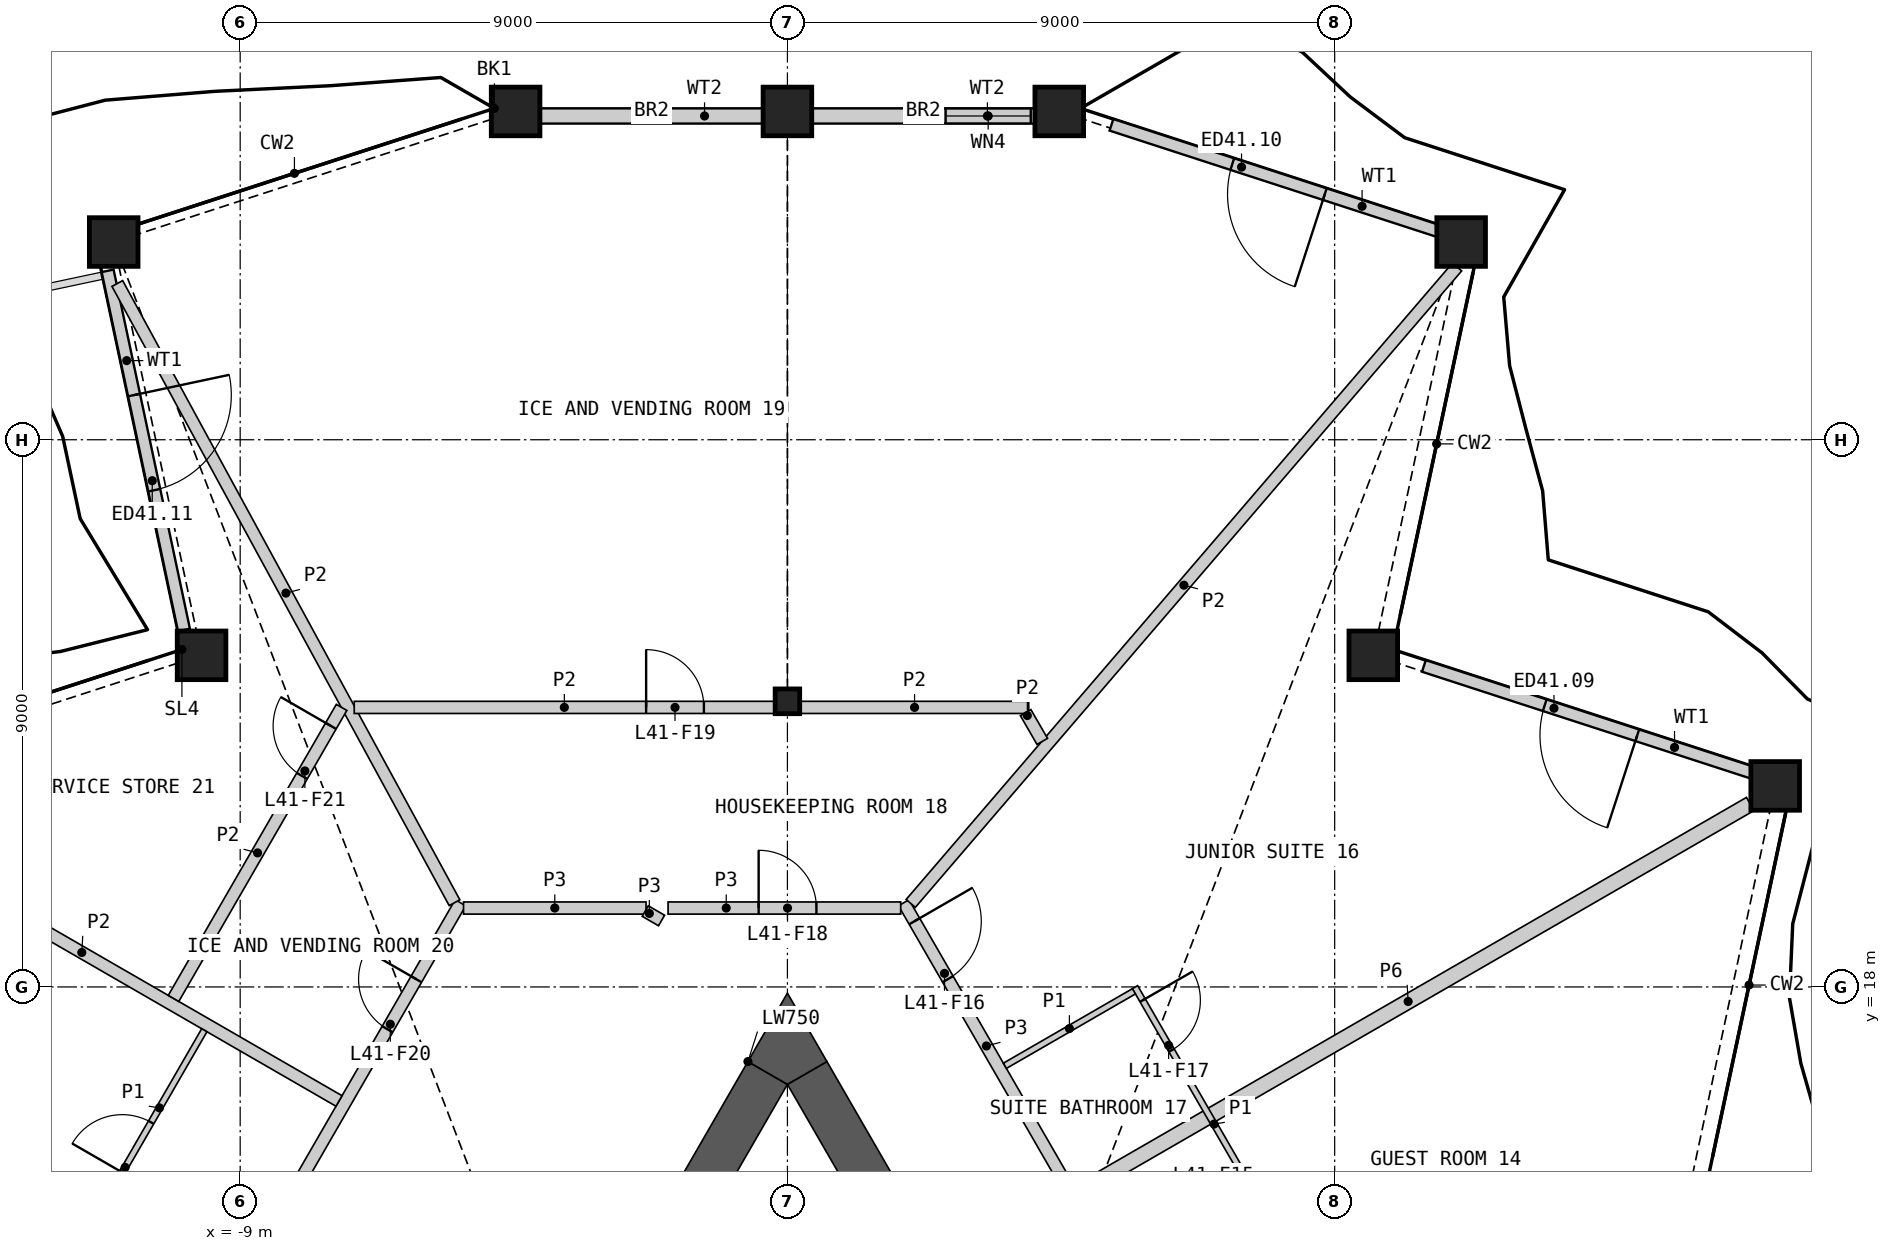
"""IFC4 building model, lengths in metres.
Left out: names, types, materials, properties, quantities, classifications, styles, units other than length and angle.
Written with IfcOpenShell. Run it as: python <this file> out.ifc"""

import sys

from ifc_helpers import new_model, si_unit, direction, frame, frame_2d, origin, origin_2d, place, context, subcontext, project, spatial, polyline, rectangle, hollow_rectangle, i_section, outline, extrude, element, fill, save


model = new_model("IFC4")
c1 = context("Model", 3, precision=1e-05, world=origin(), true_north=direction((0.0, 1.0)))
c2 = subcontext(c1, "Body", "Model", "MODEL_VIEW")
j1 = project(units=[si_unit("LENGTHUNIT", "METRE"), si_unit("PLANEANGLEUNIT", "RADIAN")], contexts=[c1])
p1 = place(None, origin())
s1 = spatial("IfcSite", under=j1, at=p1, CompositionType="ELEMENT")
p2 = place(p1, origin())
s2 = spatial("IfcBuilding", under=s1, at=p2, CompositionType="ELEMENT")
p3 = place(p2, frame((0.0, 0.0, 190.8)))
s3 = spatial("IfcBuildingStorey", under=s2, at=p3, CompositionType="ELEMENT", Elevation=190.8)
for number, where, z_axis, x_axis in (
    (1, (16.245, 21.306, 0.0), (0.0, 0.0, 1.0), (1.0, 0.0, 0.0)),
    (2, (9.635, 23.454, 0.0), (0.0, 0.0, 1.0), (1.0, 0.0, 0.0)),
    (3, (11.08, 30.252, 0.0), (0.0, 0.0, 1.0), (1.0, 0.0, 0.0)),
    (4, (4.47, 32.399, 0.0), (0.0, 0.0, 1.0), (1.0, 0.0, 0.0)),
    (5, (0.0, 32.399, 0.0), (0.0, 0.0, 1.0), (1.0, 0.0, 0.0)),
    (6, (-4.47, 32.399, 0.0), (0.0, 0.0, 1.0), (1.0, 0.0, 0.0)),
    (7, (-11.08, 30.252, 0.0), (0.0, 0.0, 1.0), (1.0, 0.0, 0.0)),
    (8, (-9.635, 23.454, 0.0), (0.0, 0.0, 1.0), (1.0, 0.0, 0.0)),
):
    element("IfcColumn", number, at=place(p3, frame(where, z_axis=z_axis, x_axis=x_axis)), inside=s3, PredefinedType="COLUMN", context=c2, shape_type="SweptSolid", body=[
        extrude(hollow_rectangle(XDim=0.8, YDim=0.8, WallThickness=0.05, at=origin_2d()), origin(), (0.0, 0.0, 1.0), 3.6),
    ])
p4 = place(p3, frame((0.0, 22.698, 0.0), z_axis=(0.0, 0.0, 1.0), x_axis=(1.0, 0.0, 0.0)))
e9 = element("IfcColumn", 9, at=p4, inside=s3, PredefinedType="COLUMN", context=c2, shape_type="SweptSolid", body=[
    extrude(i_section(OverallWidth=0.404, OverallDepth=0.407, WebThickness=0.027, FlangeThickness=0.044, at=origin_2d()), origin(), (0.0, 0.0, 1.0), 3.6),
])
p5 = place(p3, frame((15.963, 21.493, 0.0), z_axis=(0.0, 0.0, 1.0), x_axis=(-0.951059834965, 0.309006780371, 0.0)))
e10 = element("IfcWall", 10, at=p5, inside=s3, PredefinedType="SOLIDWALL", context=c2, shape_type="SweptSolid", body=[
    extrude(rectangle(XDim=5.779, YDim=0.2, at=frame_2d((2.889, 0.0))), origin(), (0.0, 0.0, 1.0), 2.701),
])
p6 = place(p5, frame((2.089, 0.0, 0.0)))
e11 = element("IfcOpeningElement", 11, at=p6, cuts=e10, PredefinedType="OPENING", context=c2, shape_type="SweptSolid", body=[
    extrude(rectangle(XDim=1.6, YDim=2.4, at=frame_2d((0.8, 1.2))), frame((0.0, 0.11, 0.0), z_axis=(0.0, -1.0, 0.0), x_axis=(1.0, 0.0, 0.0)), (0.0, 0.0, 1.0), 0.22),
])
p7 = place(p3, frame((10.825, 30.394, 0.0), z_axis=(0.0, 0.0, 1.0), x_axis=(-0.9510558006, 0.30901919705, 0.0)))
e12 = element("IfcWall", 12, at=p7, inside=s3, PredefinedType="SOLIDWALL", context=c2, shape_type="SweptSolid", body=[
    extrude(rectangle(XDim=5.778, YDim=0.2, at=frame_2d((2.889, 0.0))), origin(), (0.0, 0.0, 1.0), 2.701),
])
p8 = place(p7, frame((2.089, 0.0, 0.0)))
e13 = element("IfcOpeningElement", 13, at=p8, cuts=e12, PredefinedType="OPENING", context=c2, shape_type="SweptSolid", body=[
    extrude(rectangle(XDim=1.6, YDim=2.4, at=frame_2d((0.8, 1.2))), frame((0.0, 0.11, 0.0), z_axis=(0.0, -1.0, 0.0), x_axis=(1.0, 0.0, 0.0)), (0.0, 0.0, 1.0), 0.22),
])
p9 = place(p3, frame((4.252, 32.325, 0.0), z_axis=(0.0, 0.0, 1.0), x_axis=(-1.0, 0.0, 0.0)))
e14 = element("IfcWall", 14, at=p9, inside=s3, PredefinedType="SOLIDWALL", context=c2, shape_type="SweptSolid", body=[
    extrude(rectangle(XDim=3.852, YDim=0.25, at=frame_2d((1.926, 0.0))), origin(), (0.0, 0.0, 1.0), 2.701),
])
p10 = place(p9, frame((0.25, 0.0, 0.4)))
e15 = element("IfcOpeningElement", 15, at=p10, cuts=e14, PredefinedType="OPENING", context=c2, shape_type="SweptSolid", body=[
    extrude(rectangle(XDim=1.4, YDim=0.7, at=frame_2d((0.7, 0.35))), frame((0.0, 0.135, 0.0), z_axis=(0.0, -1.0, 0.0), x_axis=(1.0, 0.0, 0.0)), (0.0, 0.0, 1.0), 0.27),
])
p11 = place(p3, frame((-0.4, 32.325, 0.0), z_axis=(0.0, 0.0, 1.0), x_axis=(-1.0, 0.0, 0.0)))
e16 = element("IfcWall", 16, at=p11, inside=s3, PredefinedType="SOLIDWALL", context=c2, shape_type="SweptSolid", body=[
    extrude(rectangle(XDim=3.852, YDim=0.25, at=frame_2d((1.926, 0.0))), origin(), (0.0, 0.0, 1.0), 2.701),
])
p12 = place(p3, frame((-11.18, 29.778, 0.0), z_axis=(0.0, 0.0, 1.0), x_axis=(0.207894531291, -0.978151247946, 0.0)))
e17 = element("IfcWall", 17, at=p12, inside=s3, PredefinedType="SOLIDWALL", context=c2, shape_type="SweptSolid", body=[
    extrude(rectangle(XDim=6.04, YDim=0.2, at=frame_2d((3.02, 0.0))), origin(), (0.0, 0.0, 1.0), 2.701),
])
p13 = place(p12, frame((2.089, 0.0, 0.0)))
e18 = element("IfcOpeningElement", 18, at=p13, cuts=e17, PredefinedType="OPENING", context=c2, shape_type="SweptSolid", body=[
    extrude(rectangle(XDim=1.6, YDim=2.4, at=frame_2d((0.8, 1.2))), frame((0.0, 0.11, 0.0), z_axis=(0.0, -1.0, 0.0), x_axis=(1.0, 0.0, 0.0)), (0.0, 0.0, 1.0), 0.22),
])
p14 = place(p3, frame((6.875, 5.24, 0.0), z_axis=(0.0, 0.0, 1.0), x_axis=(-0.499997217876, 0.866027010039, 0.0)))
e19 = element("IfcWall", 19, at=p14, inside=s3, PredefinedType="SHEAR", context=c2, shape_type="SweptSolid", body=[
    extrude(rectangle(XDim=13.101, YDim=0.75, at=frame_2d((6.551, 0.0))), origin(), (0.0, 0.0, 1.0), 3.25),
])
p15 = place(p3, frame((-0.325, 16.585, 0.0), z_axis=(0.0, 0.0, 1.0), x_axis=(-0.500012199891, -0.86601836006, 0.0)))
e20 = element("IfcWall", 20, at=p15, inside=s3, PredefinedType="SHEAR", context=c2, shape_type="SweptSolid", body=[
    extrude(rectangle(XDim=7.051, YDim=0.75, at=frame_2d((3.525, 0.0))), origin(), (0.0, 0.0, 1.0), 3.25),
])
p16 = place(p3, origin())
e21 = element("IfcWall", 21, at=p16, inside=s3, PredefinedType="SHEAR", context=c2, shape_type="SweptSolid", body=[
    extrude(outline(polyline([(-0.649, 16.773), (0.0, 17.898), (0.649, 16.773), (0.0, 16.398), (-0.649, 16.773)])), origin(), (0.0, 0.0, 1.0), 3.25),
])
p17 = place(p3, frame((-19.476, -5.035, 0.0), z_axis=(0.0, 0.0, 1.0), x_axis=(0.500000757641, 0.86602496636, 0.0)))
e22 = element("IfcWall", 22, at=p17, inside=s3, PredefinedType="PARTITIONING", context=c2, shape_type="SweptSolid", body=[
    extrude(rectangle(XDim=28.198, YDim=0.2, at=frame_2d((14.099, 0.0))), origin(), (0.0, 0.0, 1.0), 3.25),
])
p18 = place(p17, frame((25.796, 0.0, 0.0)))
e23 = element("IfcOpeningElement", 23, at=p18, cuts=e22, PredefinedType="OPENING", context=c2, shape_type="SweptSolid", body=[
    extrude(rectangle(XDim=0.95, YDim=2.1, at=frame_2d((0.475, 1.05))), frame((0.0, 0.11, 0.0), z_axis=(0.0, -1.0, 0.0), x_axis=(1.0, 0.0, 0.0)), (0.0, 0.0, 1.0), 0.22),
])
p19 = place(p17, frame((14.603, 0.0, 0.0)))
e24 = element("IfcOpeningElement", 24, at=p19, cuts=e22, PredefinedType="OPENING", context=c2, shape_type="SweptSolid", body=[
    extrude(rectangle(XDim=1.1, YDim=2.1, at=frame_2d((0.55, 1.05))), frame((0.0, 0.11, 0.0), z_axis=(0.0, -1.0, 0.0), x_axis=(1.0, 0.0, 0.0)), (0.0, 0.0, 1.0), 0.22),
])
p20 = place(p17, frame((11.993, 0.0, 0.0)))
e25 = element("IfcOpeningElement", 25, at=p20, cuts=e22, PredefinedType="OPENING", context=c2, shape_type="SweptSolid", body=[
    extrude(rectangle(XDim=1.1, YDim=2.1, at=frame_2d((0.55, 1.05))), frame((0.0, 0.11, 0.0), z_axis=(0.0, -1.0, 0.0), x_axis=(1.0, 0.0, 0.0)), (0.0, 0.0, 1.0), 0.22),
])
p21 = place(p17, frame((1.452, 0.0, 0.0)))
e26 = element("IfcOpeningElement", 26, at=p21, cuts=e22, PredefinedType="OPENING", context=c2, shape_type="SweptSolid", body=[
    extrude(rectangle(XDim=0.95, YDim=2.1, at=frame_2d((0.475, 1.05))), frame((0.0, 0.11, 0.0), z_axis=(0.0, -1.0, 0.0), x_axis=(1.0, 0.0, 0.0)), (0.0, 0.0, 1.0), 0.22),
])
p22 = place(p3, frame((4.582, 14.512, 0.0), z_axis=(0.0, 0.0, 1.0), x_axis=(0.866027263711, 0.4999967785, 0.0)))
e27 = element("IfcWall", 27, at=p22, inside=s3, PredefinedType="PARTITIONING", context=c2, shape_type="SweptSolid", body=[
    extrude(rectangle(XDim=12.994, YDim=0.25, at=frame_2d((6.497, 0.0))), origin(), (0.0, 0.0, 1.0), 2.404),
])
p23 = place(p3, frame((1.913, 19.385, 0.0), z_axis=(0.0, 0.0, 1.0), x_axis=(0.499972435384, -0.866041317638, 0.0)))
e28 = element("IfcWall", 28, at=p23, inside=s3, PredefinedType="PARTITIONING", context=c2, shape_type="SweptSolid", body=[
    extrude(rectangle(XDim=5.439, YDim=0.2, at=frame_2d((2.719, 0.0))), origin(), (0.0, 0.0, 1.0), 3.25),
])
p24 = place(p23, frame((0.351, 0.0, 0.0)))
e29 = element("IfcOpeningElement", 29, at=p24, cuts=e28, PredefinedType="OPENING", context=c2, shape_type="SweptSolid", body=[
    extrude(rectangle(XDim=1.1, YDim=2.1, at=frame_2d((0.55, 1.05))), frame((0.0, 0.11, 0.0), z_axis=(0.0, -1.0, 0.0), x_axis=(1.0, 0.0, 0.0)), (0.0, 0.0, 1.0), 0.22),
])
p25 = place(p3, frame((-1.963, 19.298, 0.0), z_axis=(0.0, 0.0, 1.0), x_axis=(1.0, 0.0, 0.0)))
e30 = element("IfcWall", 30, at=p25, inside=s3, PredefinedType="PARTITIONING", context=c2, shape_type="SweptSolid", body=[
    extrude(rectangle(XDim=3.826, YDim=0.2, at=frame_2d((1.913, 0.0))), origin(), (0.0, 0.0, 1.0), 3.25),
])
p26 = place(p25, frame((1.49, 0.0, 0.0)))
e31 = element("IfcOpeningElement", 31, at=p26, cuts=e30, PredefinedType="OPENING", context=c2, shape_type="SweptSolid", body=[
    extrude(rectangle(XDim=0.95, YDim=2.1, at=frame_2d((0.475, 1.05))), frame((0.0, 0.11, 0.0), z_axis=(0.0, -1.0, 0.0), x_axis=(1.0, 0.0, 0.0)), (0.0, 0.0, 1.0), 0.22),
])
p27 = place(p3, frame((-5.327, 19.298, 0.0), z_axis=(0.0, 0.0, 1.0), x_axis=(1.0, 0.0, 0.0)))
e32 = element("IfcWall", 32, at=p27, inside=s3, PredefinedType="PARTITIONING", context=c2, shape_type="SweptSolid", body=[
    extrude(rectangle(XDim=3.002, YDim=0.2, at=frame_2d((1.501, 0.0))), origin(), (0.0, 0.0, 1.0), 3.25),
])
p28 = place(p3, frame((-2.338, 19.248, 0.0), z_axis=(0.0, 0.0, 1.0), x_axis=(0.866395311824, -0.499358752451, 0.0)))
e33 = element("IfcWall", 33, at=p28, inside=s3, PredefinedType="PARTITIONING", context=c2, shape_type="SweptSolid", body=[
    extrude(rectangle(XDim=0.31, YDim=0.2, at=frame_2d((0.155, 0.0))), origin(), (0.0, 0.0, 1.0), 3.25),
])
p29 = place(p3, frame((2.028, 19.374, 0.0), z_axis=(0.0, 0.0, 1.0), x_axis=(0.651304244859, 0.758816697647, 0.0)))
e34 = element("IfcWall", 34, at=p29, inside=s3, PredefinedType="PARTITIONING", context=c2, shape_type="SweptSolid", body=[
    extrude(rectangle(XDim=13.795, YDim=0.2, at=frame_2d((6.897, 0.0))), origin(), (0.0, 0.0, 1.0), 2.404),
])
p30 = place(p3, frame((-11.021, 29.57, 0.0), z_axis=(0.0, 0.0, 1.0), x_axis=(0.478233946204, -0.878232482147, 0.0)))
e35 = element("IfcWall", 35, at=p30, inside=s3, PredefinedType="PARTITIONING", context=c2, shape_type="SweptSolid", body=[
    extrude(rectangle(XDim=11.596, YDim=0.2, at=frame_2d((5.798, 0.0))), origin(), (0.0, 0.0, 1.0), 2.404),
])
p31 = place(p3, frame((-15.835, 21.009, 0.0), z_axis=(0.0, 0.0, 1.0), x_axis=(0.866024525919, -0.500001520505, 0.0)))
e36 = element("IfcWall", 36, at=p31, inside=s3, PredefinedType="PARTITIONING", context=c2, shape_type="SweptSolid", body=[
    extrude(rectangle(XDim=9.769, YDim=0.2, at=frame_2d((4.885, 0.0))), origin(), (0.0, 0.0, 1.0), 2.404),
])
p32 = place(p3, frame((-7.124, 22.598, 0.0), z_axis=(0.0, 0.0, 1.0), x_axis=(1.0, 0.0, 0.0)))
e37 = element("IfcWall", 37, at=p32, inside=s3, PredefinedType="PARTITIONING", context=c2, shape_type="SweptSolid", body=[
    extrude(rectangle(XDim=6.911, YDim=0.2, at=frame_2d((3.455, 0.0))), origin(), (0.0, 0.0, 1.0), 2.404),
])
p33 = place(p32, frame((4.801, 0.0, 0.0)))
e38 = element("IfcOpeningElement", 38, at=p33, cuts=e37, PredefinedType="OPENING", context=c2, shape_type="SweptSolid", body=[
    extrude(rectangle(XDim=0.95, YDim=2.1, at=frame_2d((0.475, 1.05))), frame((0.0, 0.11, 0.0), z_axis=(0.0, -1.0, 0.0), x_axis=(1.0, 0.0, 0.0)), (0.0, 0.0, 1.0), 0.22),
])
p34 = place(p3, frame((-10.096, 17.811, 0.0), z_axis=(0.0, 0.0, 1.0), x_axis=(0.500015590807, 0.866016402241, 0.0)))
e39 = element("IfcWall", 39, at=p34, inside=s3, PredefinedType="PARTITIONING", context=c2, shape_type="SweptSolid", body=[
    extrude(rectangle(XDim=5.527, YDim=0.2, at=frame_2d((2.764, 0.0))), origin(), (0.0, 0.0, 1.0), 2.404),
])
p35 = place(p34, frame((4.225, 0.0, 0.0)))
e40 = element("IfcOpeningElement", 40, at=p35, cuts=e39, PredefinedType="OPENING", context=c2, shape_type="SweptSolid", body=[
    extrude(rectangle(XDim=0.95, YDim=2.1, at=frame_2d((0.475, 1.05))), frame((0.0, 0.11, 0.0), z_axis=(0.0, -1.0, 0.0), x_axis=(1.0, 0.0, 0.0)), (0.0, 0.0, 1.0), 0.22),
])
p36 = place(p3, frame((0.214, 22.598, 0.0), z_axis=(0.0, 0.0, 1.0), x_axis=(1.0, 0.0, 0.0)))
e41 = element("IfcWall", 41, at=p36, inside=s3, PredefinedType="PARTITIONING", context=c2, shape_type="SweptSolid", body=[
    extrude(rectangle(XDim=3.755, YDim=0.2, at=frame_2d((1.877, 0.0))), origin(), (0.0, 0.0, 1.0), 2.404),
])
p37 = place(p3, frame((3.918, 22.511, 0.0), z_axis=(0.0, 0.0, 1.0), x_axis=(0.500083826171, -0.865977001312, 0.0)))
e42 = element("IfcWall", 42, at=p37, inside=s3, PredefinedType="PARTITIONING", context=c2, shape_type="SweptSolid", body=[
    extrude(rectangle(XDim=0.546, YDim=0.2, at=frame_2d((0.273, 0.0))), origin(), (0.0, 0.0, 1.0), 2.404),
])
p38 = place(p3, frame((5.717, 17.996, 0.0), z_axis=(0.0, 0.0, 1.0), x_axis=(0.500027264788, -0.866009661879, 0.0)))
e43 = element("IfcWall", 43, at=p38, inside=s3, PredefinedType="PARTITIONING", context=c2, shape_type="SweptSolid", body=[
    extrude(rectangle(XDim=5.2, YDim=0.1, at=frame_2d((2.6, 0.0))), origin(), (0.0, 0.0, 1.0), 2.404),
])
p39 = place(p38, frame((4.0, 0.0, 0.0)))
e44 = element("IfcOpeningElement", 44, at=p39, cuts=e43, PredefinedType="OPENING", context=c2, shape_type="SweptSolid", body=[
    extrude(rectangle(XDim=0.95, YDim=2.1, at=frame_2d((0.475, 1.05))), frame((0.0, 0.06, 0.0), z_axis=(0.0, -1.0, 0.0), x_axis=(1.0, 0.0, 0.0)), (0.0, 0.0, 1.0), 0.12),
])
p40 = place(p38, frame((0.25, 0.0, 0.0)))
e45 = element("IfcOpeningElement", 45, at=p40, cuts=e43, PredefinedType="OPENING", context=c2, shape_type="SweptSolid", body=[
    extrude(rectangle(XDim=0.95, YDim=2.1, at=frame_2d((0.475, 1.05))), frame((0.0, 0.06, 0.0), z_axis=(0.0, -1.0, 0.0), x_axis=(1.0, 0.0, 0.0)), (0.0, 0.0, 1.0), 0.12),
])
p41 = place(p3, frame((-11.065, 14.733, 0.0), z_axis=(0.0, 0.0, 1.0), x_axis=(0.500037662692, 0.866003658127, 0.0)))
e46 = element("IfcWall", 46, at=p41, inside=s3, PredefinedType="PARTITIONING", context=c2, shape_type="SweptSolid", body=[
    extrude(rectangle(XDim=2.95, YDim=0.1, at=frame_2d((1.475, 0.0))), origin(), (0.0, 0.0, 1.0), 2.404),
])
p42 = place(p41, frame((0.25, 0.0, 0.0)))
e47 = element("IfcOpeningElement", 47, at=p42, cuts=e46, PredefinedType="OPENING", context=c2, shape_type="SweptSolid", body=[
    extrude(rectangle(XDim=0.95, YDim=2.1, at=frame_2d((0.475, 1.05))), frame((0.0, 0.06, 0.0), z_axis=(0.0, -1.0, 0.0), x_axis=(1.0, 0.0, 0.0)), (0.0, 0.0, 1.0), 0.12),
])
p43 = place(p3, frame((3.576, 16.703, 0.0), z_axis=(0.0, 0.0, 1.0), x_axis=(0.866057815567, 0.499943856944, 0.0)))
e48 = element("IfcWall", 48, at=p43, inside=s3, PredefinedType="PARTITIONING", context=c2, shape_type="SweptSolid", body=[
    extrude(rectangle(XDim=2.45, YDim=0.1, at=frame_2d((1.225, 0.0))), origin(), (0.0, 0.0, 1.0), 2.404),
])
p44 = place(p6, origin())
e49 = element("IfcDoor", 49, at=p44, inside=s3, OperationType="DOUBLE_DOOR_SINGLE_SWING", PredefinedType="DOOR", context=c2, shape_type="SweptSolid", body=[
    extrude(rectangle(XDim=1.6, YDim=2.4, at=frame_2d((0.8, 1.2))), frame((0.0, 0.025, 0.0), z_axis=(0.0, -1.0, 0.0), x_axis=(1.0, 0.0, 0.0)), (0.0, 0.0, 1.0), 0.05),
])
fill(e11, e49)
p45 = place(p8, origin())
e50 = element("IfcDoor", 50, at=p45, inside=s3, OperationType="DOUBLE_DOOR_SINGLE_SWING", PredefinedType="DOOR", context=c2, shape_type="SweptSolid", body=[
    extrude(rectangle(XDim=1.6, YDim=2.4, at=frame_2d((0.8, 1.2))), frame((0.0, 0.025, 0.0), z_axis=(0.0, -1.0, 0.0), x_axis=(1.0, 0.0, 0.0)), (0.0, 0.0, 1.0), 0.05),
])
fill(e13, e50)
p46 = place(p10, origin())
e51 = element("IfcWindow", 51, at=p46, inside=s3, PartitioningType="SINGLE_PANEL", PredefinedType="WINDOW", context=c2, shape_type="SweptSolid", body=[
    extrude(rectangle(XDim=1.4, YDim=0.7, at=frame_2d((0.7, 0.35))), frame((0.0, 0.03, 0.0), z_axis=(0.0, -1.0, 0.0), x_axis=(1.0, 0.0, 0.0)), (0.0, 0.0, 1.0), 0.06),
])
fill(e15, e51)
p47 = place(p13, origin())
e52 = element("IfcDoor", 52, at=p47, inside=s3, OperationType="DOUBLE_DOOR_SINGLE_SWING", PredefinedType="DOOR", context=c2, shape_type="SweptSolid", body=[
    extrude(rectangle(XDim=1.6, YDim=2.4, at=frame_2d((0.8, 1.2))), frame((0.0, 0.025, 0.0), z_axis=(0.0, -1.0, 0.0), x_axis=(1.0, 0.0, 0.0)), (0.0, 0.0, 1.0), 0.05),
])
fill(e18, e52)
p48 = place(p24, origin())
e53 = element("IfcDoor", 53, at=p48, inside=s3, OperationType="SINGLE_SWING_LEFT", PredefinedType="DOOR", context=c2, shape_type="SweptSolid", body=[
    extrude(rectangle(XDim=1.1, YDim=2.1, at=frame_2d((0.55, 1.05))), frame((0.0, 0.025, 0.0), z_axis=(0.0, -1.0, 0.0), x_axis=(1.0, 0.0, 0.0)), (0.0, 0.0, 1.0), 0.05),
])
fill(e29, e53)
p49 = place(p40, origin())
e54 = element("IfcDoor", 54, at=p49, inside=s3, OperationType="SINGLE_SWING_LEFT", PredefinedType="DOOR", context=c2, shape_type="SweptSolid", body=[
    extrude(rectangle(XDim=0.95, YDim=2.1, at=frame_2d((0.475, 1.05))), frame((0.0, 0.025, 0.0), z_axis=(0.0, -1.0, 0.0), x_axis=(1.0, 0.0, 0.0)), (0.0, 0.0, 1.0), 0.05),
])
fill(e45, e54)
p50 = place(p26, origin())
e55 = element("IfcDoor", 55, at=p50, inside=s3, OperationType="SINGLE_SWING_LEFT", PredefinedType="DOOR", context=c2, shape_type="SweptSolid", body=[
    extrude(rectangle(XDim=0.95, YDim=2.1, at=frame_2d((0.475, 1.05))), frame((0.0, 0.025, 0.0), z_axis=(0.0, -1.0, 0.0), x_axis=(1.0, 0.0, 0.0)), (0.0, 0.0, 1.0), 0.05),
])
fill(e31, e55)
p51 = place(p33, origin())
e56 = element("IfcDoor", 56, at=p51, inside=s3, OperationType="SINGLE_SWING_LEFT", PredefinedType="DOOR", context=c2, shape_type="SweptSolid", body=[
    extrude(rectangle(XDim=0.95, YDim=2.1, at=frame_2d((0.475, 1.05))), frame((0.0, 0.025, 0.0), z_axis=(0.0, -1.0, 0.0), x_axis=(1.0, 0.0, 0.0)), (0.0, 0.0, 1.0), 0.05),
])
fill(e38, e56)
p52 = place(p18, origin())
e57 = element("IfcDoor", 57, at=p52, inside=s3, OperationType="SINGLE_SWING_RIGHT", PredefinedType="DOOR", context=c2, shape_type="SweptSolid", body=[
    extrude(rectangle(XDim=0.95, YDim=2.1, at=frame_2d((0.475, 1.05))), frame((0.0, 0.025, 0.0), z_axis=(0.0, -1.0, 0.0), x_axis=(1.0, 0.0, 0.0)), (0.0, 0.0, 1.0), 0.05),
])
fill(e23, e57)
p53 = place(p35, origin())
e58 = element("IfcDoor", 58, at=p53, inside=s3, OperationType="SINGLE_SWING_RIGHT", PredefinedType="DOOR", context=c2, shape_type="SweptSolid", body=[
    extrude(rectangle(XDim=0.95, YDim=2.1, at=frame_2d((0.475, 1.05))), frame((0.0, 0.025, 0.0), z_axis=(0.0, -1.0, 0.0), x_axis=(1.0, 0.0, 0.0)), (0.0, 0.0, 1.0), 0.05),
])
fill(e40, e58)
p54 = place(p42, origin())
e59 = element("IfcDoor", 59, at=p54, inside=s3, OperationType="SINGLE_SWING_LEFT", PredefinedType="DOOR", context=c2, shape_type="SweptSolid", body=[
    extrude(rectangle(XDim=0.95, YDim=2.1, at=frame_2d((0.475, 1.05))), frame((0.0, 0.025, 0.0), z_axis=(0.0, -1.0, 0.0), x_axis=(1.0, 0.0, 0.0)), (0.0, 0.0, 1.0), 0.05),
])
fill(e47, e59)
save(model, sys.argv[1])
